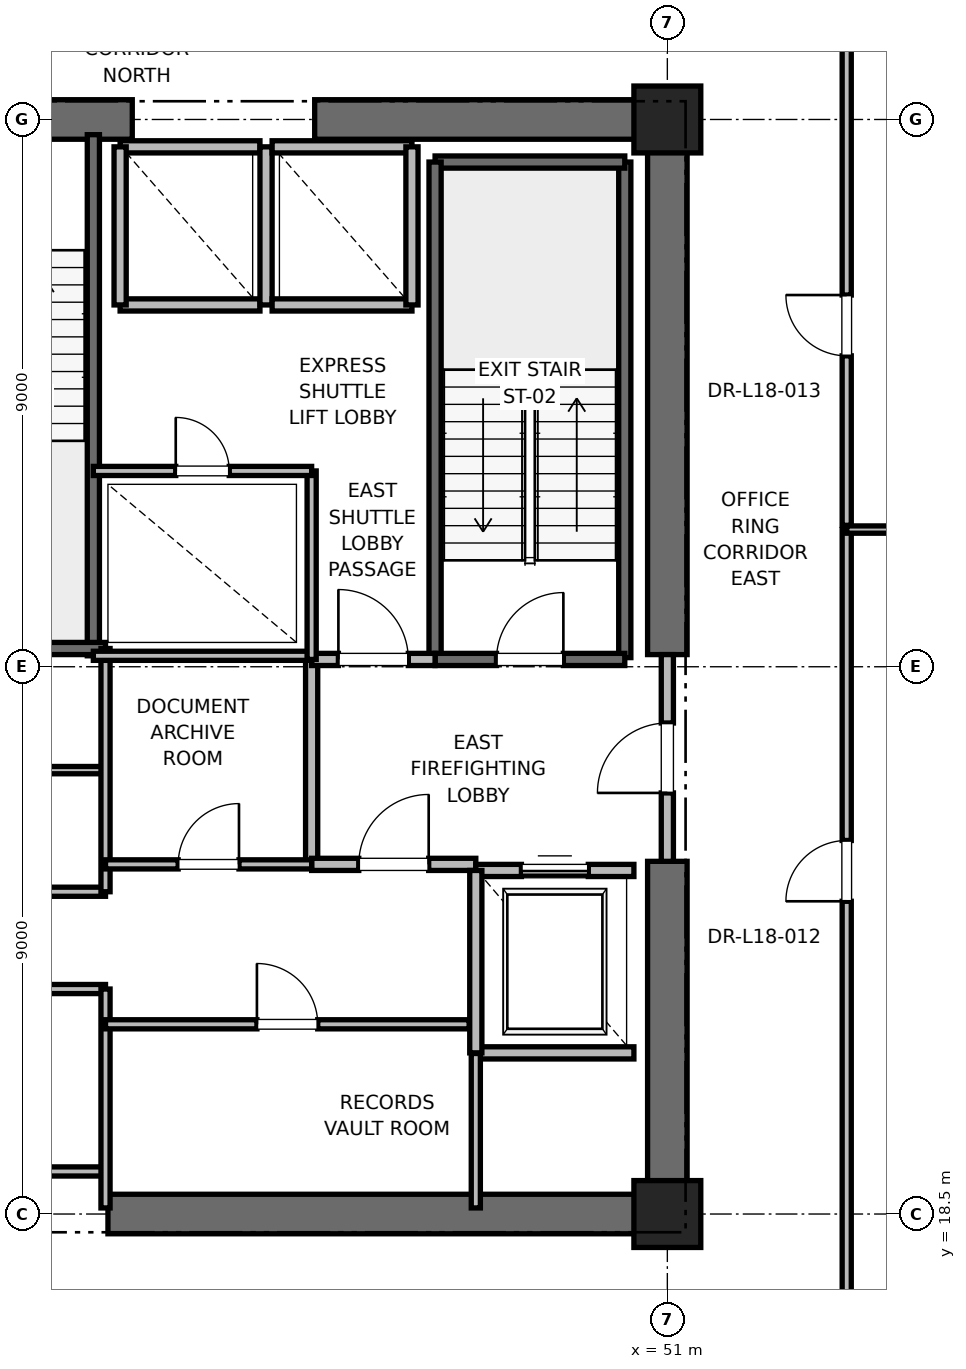
"""IFC4 building model, lengths in metres.
Left out: names, types, materials, properties, quantities, classifications, styles, units other than length and angle.
Written with IfcOpenShell. Run it as: python <this file> out.ifc"""

import sys

from ifc_helpers import new_model, si_unit, direction, frame, frame_2d, origin, origin_2d, place, context, subcontext, project, spatial, rectangle, extrude, element, fill, save


model = new_model("IFC4")
c1 = context("Model", 3, precision=1e-05, world=origin(), true_north=direction((0.0, 1.0)))
c2 = subcontext(c1, "Body", "Model", "MODEL_VIEW")
j1 = project(units=[si_unit("LENGTHUNIT", "METRE"), si_unit("PLANEANGLEUNIT", "RADIAN")], contexts=[c1])
p1 = place(None, origin())
s1 = spatial("IfcSite", under=j1, at=p1, CompositionType="ELEMENT")
p2 = place(p1, origin())
s2 = spatial("IfcBuilding", under=s1, at=p2, CompositionType="ELEMENT")
p3 = place(p2, frame((0.0, 0.0, 79.6)))
s3 = spatial("IfcBuildingStorey", under=s2, at=p3, CompositionType="ELEMENT", Elevation=79.6)
for number, where, z_axis, x_axis in (
    (1, (51.0, 18.5, 0.0), (0.0, 0.0, 1.0), (1.0, 0.0, 0.0)),
    (2, (51.0, 36.5, 0.0), (0.0, 0.0, 1.0), (1.0, 0.0, 0.0)),
):
    element("IfcColumn", number, at=place(p3, frame(where, z_axis=z_axis, x_axis=x_axis)), inside=s3, PredefinedType="PILASTER", context=c2, shape_type="SweptSolid", body=[
        extrude(rectangle(XDim=1.1, YDim=1.1, at=origin_2d()), origin(), (0.0, 0.0, 1.0), 4.0),
    ])
p4 = place(p3, frame((41.8, 18.5, 0.0), z_axis=(0.0, 0.0, 1.0), x_axis=(1.0, 0.0, 0.0)))
e3 = element("IfcWall", 3, at=p4, inside=s3, PredefinedType="SHEAR", context=c2, shape_type="SweptSolid", body=[
    extrude(rectangle(XDim=9.2, YDim=0.65, at=frame_2d((4.6, 0.0))), origin(), (0.0, 0.0, 1.0), 3.76),
])
p5 = place(p3, frame((37.8, 36.5, 0.0), z_axis=(0.0, 0.0, 1.0), x_axis=(1.0, 0.0, 0.0)))
e4 = element("IfcWall", 4, at=p5, inside=s3, PredefinedType="SHEAR", context=c2, shape_type="SweptSolid", body=[
    extrude(rectangle(XDim=4.4, YDim=0.65, at=frame_2d((2.2, 0.0))), origin(), (0.0, 0.0, 1.0), 3.76),
])
p6 = place(p5, frame((1.65, 0.0, 0.0)))
e5 = element("IfcOpeningElement", 5, at=p6, cuts=e4, PredefinedType="OPENING", context=c2, shape_type="SweptSolid", body=[
    extrude(rectangle(XDim=1.1, YDim=2.15, at=frame_2d((0.55, 1.075))), frame((0.0, 0.325, 0.0), z_axis=(0.0, -1.0, 0.0), x_axis=(1.0, 0.0, 0.0)), (0.0, 0.0, 1.0), 0.65),
])
for number, where, z_axis, x_axis in (
    (6, (45.2, 36.5, 0.0), (0.0, 0.0, 1.0), (1.0, 0.0, 0.0)),
    (7, (51.0, 18.5, 0.0), (0.0, 0.0, 1.0), (0.0, 1.0, 0.0)),
):
    element("IfcWall", number, at=place(p3, frame(where, z_axis=z_axis, x_axis=x_axis)), inside=s3, PredefinedType="SHEAR", context=c2, shape_type="SweptSolid", body=[
        extrude(rectangle(XDim=5.8, YDim=0.65, at=frame_2d((2.9, 0.0))), origin(), (0.0, 0.0, 1.0), 3.76),
    ])
p7 = place(p3, frame((51.0, 27.7, 0.0), z_axis=(0.0, 0.0, 1.0), x_axis=(0.0, 1.0, 0.0)))
e8 = element("IfcWall", 8, at=p7, inside=s3, PredefinedType="SHEAR", context=c2, shape_type="SweptSolid", body=[
    extrude(rectangle(XDim=8.8, YDim=0.65, at=frame_2d((4.4, 0.0))), origin(), (0.0, 0.0, 1.0), 3.76),
])
p8 = place(p3, frame((50.3, 27.65, 0.0), z_axis=(0.0, 0.0, 1.0), x_axis=(0.0, 1.0, 0.0)))
e9 = element("IfcWall", 9, at=p8, inside=s3, PredefinedType="SOLIDWALL", context=c2, shape_type="SweptSolid", body=[
    extrude(rectangle(XDim=8.15, YDim=0.2, at=frame_2d((4.075, 0.0))), origin(), (0.0, 0.0, 1.0), 3.76),
])
p9 = place(p3, frame((47.18, 35.8, 0.0), z_axis=(0.0, 0.0, 1.0), x_axis=(1.0, 0.0, 0.0)))
e10 = element("IfcWall", 10, at=p9, inside=s3, PredefinedType="SOLIDWALL", context=c2, shape_type="SweptSolid", body=[
    extrude(rectangle(XDim=3.12, YDim=0.2, at=frame_2d((1.56, 0.0))), origin(), (0.0, 0.0, 1.0), 3.76),
])
p10 = place(p3, frame((47.18, 27.62, 0.0), z_axis=(0.0, 0.0, 1.0), x_axis=(0.0, 1.0, 0.0)))
e11 = element("IfcWall", 11, at=p10, inside=s3, PredefinedType="SOLIDWALL", context=c2, shape_type="SweptSolid", body=[
    extrude(rectangle(XDim=8.18, YDim=0.2, at=frame_2d((4.09, 0.0))), origin(), (0.0, 0.0, 1.0), 3.76),
])
p11 = place(p3, frame((47.18, 27.62, 0.0), z_axis=(0.0, 0.0, 1.0), x_axis=(1.0, 0.0, 0.0)))
e12 = element("IfcWall", 12, at=p11, inside=s3, PredefinedType="SOLIDWALL", context=c2, shape_type="SweptSolid", body=[
    extrude(rectangle(XDim=3.12, YDim=0.2, at=frame_2d((1.56, 0.0))), origin(), (0.0, 0.0, 1.0), 3.76),
])
p12 = place(p11, frame((1.01, 0.0, 0.0)))
e13 = element("IfcOpeningElement", 13, at=p12, cuts=e12, PredefinedType="OPENING", context=c2, shape_type="SweptSolid", body=[
    extrude(rectangle(XDim=1.1, YDim=2.15, at=frame_2d((0.55, 1.075))), frame((0.0, 0.1, 0.0), z_axis=(0.0, -1.0, 0.0), x_axis=(1.0, 0.0, 0.0)), (0.0, 0.0, 1.0), 0.2),
])
p13 = place(p3, frame((41.56, 27.68, 0.0), z_axis=(0.0, 0.0, 1.0), x_axis=(0.0, 1.0, 0.0)))
e14 = element("IfcWall", 14, at=p13, inside=s3, PredefinedType="SOLIDWALL", context=c2, shape_type="SweptSolid", body=[
    extrude(rectangle(XDim=8.57, YDim=0.2, at=frame_2d((4.285, 0.0))), origin(), (0.0, 0.0, 1.0), 3.76),
])
p14 = place(p3, frame((38.44, 27.8, 0.0), z_axis=(0.0, 0.0, 1.0), x_axis=(1.0, 0.0, 0.0)))
e15 = element("IfcWall", 15, at=p14, inside=s3, PredefinedType="SOLIDWALL", context=c2, shape_type="SweptSolid", body=[
    extrude(rectangle(XDim=3.32, YDim=0.2, at=frame_2d((1.66, 0.0))), origin(), (0.0, 0.0, 1.0), 3.76),
])
p15 = place(p3, frame((45.15, 24.25, 0.0), z_axis=(0.0, 0.0, 1.0), x_axis=(0.0, 1.0, 0.0)))
e16 = element("IfcWall", 16, at=p15, inside=s3, PredefinedType="PARTITIONING", context=c2, shape_type="SweptSolid", body=[
    extrude(rectangle(XDim=3.37, YDim=0.2, at=frame_2d((1.685, 0.0))), origin(), (0.0, 0.0, 1.0), 3.76),
])
p16 = place(p3, frame((45.15, 24.25, 0.0), z_axis=(0.0, 0.0, 1.0), x_axis=(1.0, 0.0, 0.0)))
e17 = element("IfcWall", 17, at=p16, inside=s3, PredefinedType="PARTITIONING", context=c2, shape_type="SweptSolid", body=[
    extrude(rectangle(XDim=2.7, YDim=0.2, at=frame_2d((1.35, 0.0))), origin(), (0.0, 0.0, 1.0), 3.76),
])
p17 = place(p16, frame((0.775, 0.0, 0.0)))
e18 = element("IfcOpeningElement", 18, at=p17, cuts=e17, PredefinedType="OPENING", context=c2, shape_type="SweptSolid", body=[
    extrude(rectangle(XDim=1.15, YDim=2.2, at=frame_2d((0.575, 1.1))), frame((0.0, 0.1, 0.0), z_axis=(0.0, -1.0, 0.0), x_axis=(1.0, 0.0, 0.0)), (0.0, 0.0, 1.0), 0.2),
])
p18 = place(p3, frame((45.15, 27.62, 0.0), z_axis=(0.0, 0.0, 1.0), x_axis=(1.0, 0.0, 0.0)))
e19 = element("IfcWall", 19, at=p18, inside=s3, PredefinedType="PARTITIONING", context=c2, shape_type="SweptSolid", body=[
    extrude(rectangle(XDim=2.03, YDim=0.2, at=frame_2d((1.015, 0.0))), origin(), (0.0, 0.0, 1.0), 3.76),
])
p19 = place(p18, frame((0.44, 0.0, 0.0)))
e20 = element("IfcOpeningElement", 20, at=p19, cuts=e19, PredefinedType="OPENING", context=c2, shape_type="SweptSolid", body=[
    extrude(rectangle(XDim=1.15, YDim=2.2, at=frame_2d((0.575, 1.1))), frame((0.0, 0.1, 0.0), z_axis=(0.0, -1.0, 0.0), x_axis=(1.0, 0.0, 0.0)), (0.0, 0.0, 1.0), 0.2),
])
p20 = place(p3, frame((51.0, 24.3, 0.0), z_axis=(0.0, 0.0, 1.0), x_axis=(0.0, 1.0, 0.0)))
e21 = element("IfcWall", 21, at=p20, inside=s3, PredefinedType="PARTITIONING", context=c2, shape_type="SweptSolid", body=[
    extrude(rectangle(XDim=3.4, YDim=0.2, at=frame_2d((1.7, 0.0))), origin(), (0.0, 0.0, 1.0), 2.54),
])
p21 = place(p20, frame((1.125, 0.0, 0.0)))
e22 = element("IfcOpeningElement", 22, at=p21, cuts=e21, PredefinedType="OPENING", context=c2, shape_type="SweptSolid", body=[
    extrude(rectangle(XDim=1.15, YDim=2.2, at=frame_2d((0.575, 1.1))), frame((0.0, 0.1, 0.0), z_axis=(0.0, -1.0, 0.0), x_axis=(1.0, 0.0, 0.0)), (0.0, 0.0, 1.0), 0.2),
])
p22 = place(p3, frame((47.85, 21.15, 0.0), z_axis=(0.0, 0.0, 1.0), x_axis=(1.0, 0.0, 0.0)))
e23 = element("IfcWall", 23, at=p22, inside=s3, PredefinedType="SOLIDWALL", context=c2, shape_type="SweptSolid", body=[
    extrude(rectangle(XDim=2.6, YDim=0.2, at=frame_2d((1.3, 0.0))), origin(), (0.0, 0.0, 1.0), 3.76),
])
p23 = place(p3, frame((50.45, 24.15, 0.0), z_axis=(0.0, 0.0, 1.0), x_axis=(-1.0, 0.0, 0.0)))
e24 = element("IfcWall", 24, at=p23, inside=s3, PredefinedType="SOLIDWALL", context=c2, shape_type="SweptSolid", body=[
    extrude(rectangle(XDim=2.6, YDim=0.2, at=frame_2d((1.3, 0.0))), origin(), (0.0, 0.0, 1.0), 2.54),
])
p24 = place(p23, frame((0.75, 0.0, 0.0)))
e25 = element("IfcOpeningElement", 25, at=p24, cuts=e24, PredefinedType="OPENING", context=c2, shape_type="SweptSolid", body=[
    extrude(rectangle(XDim=1.1, YDim=2.2, at=frame_2d((0.55, 1.1))), frame((0.0, 0.1, 0.0), z_axis=(0.0, -1.0, 0.0), x_axis=(1.0, 0.0, 0.0)), (0.0, 0.0, 1.0), 0.2),
])
p25 = place(p3, frame((47.85, 24.15, 0.0), z_axis=(0.0, 0.0, 1.0), x_axis=(0.0, -1.0, 0.0)))
e26 = element("IfcWall", 26, at=p25, inside=s3, PredefinedType="SOLIDWALL", context=c2, shape_type="SweptSolid", body=[
    extrude(rectangle(XDim=3.0, YDim=0.2, at=frame_2d((1.5, 0.0))), origin(), (0.0, 0.0, 1.0), 3.76),
])
p26 = place(p3, frame((42.0, 33.45, 0.0), z_axis=(0.0, 0.0, 1.0), x_axis=(1.0, 0.0, 0.0)))
e27 = element("IfcWall", 27, at=p26, inside=s3, PredefinedType="SOLIDWALL", context=c2, shape_type="SweptSolid", body=[
    extrude(rectangle(XDim=2.3, YDim=0.2, at=frame_2d((1.15, 0.0))), origin(), (0.0, 0.0, 1.0), 3.76),
])
p27 = place(p3, frame((44.3, 36.05, 0.0), z_axis=(0.0, 0.0, 1.0), x_axis=(-1.0, 0.0, 0.0)))
e28 = element("IfcWall", 28, at=p27, inside=s3, PredefinedType="SOLIDWALL", context=c2, shape_type="SweptSolid", body=[
    extrude(rectangle(XDim=2.3, YDim=0.2, at=frame_2d((1.15, 0.0))), origin(), (0.0, 0.0, 1.0), 2.54),
])
for number, where, z_axis, x_axis in (
    (29, (42.0, 36.05, 0.0), (0.0, 0.0, 1.0), (0.0, -1.0, 0.0)),
    (30, (44.4, 33.45, 0.0), (0.0, 0.0, 1.0), (0.0, 1.0, 0.0)),
):
    element("IfcWall", number, at=place(p3, frame(where, z_axis=z_axis, x_axis=x_axis)), inside=s3, PredefinedType="SOLIDWALL", context=c2, shape_type="SweptSolid", body=[
        extrude(rectangle(XDim=2.6, YDim=0.2, at=frame_2d((1.3, 0.0))), origin(), (0.0, 0.0, 1.0), 2.54),
    ])
p28 = place(p3, frame((44.5, 33.45, 0.0), z_axis=(0.0, 0.0, 1.0), x_axis=(1.0, 0.0, 0.0)))
e31 = element("IfcWall", 31, at=p28, inside=s3, PredefinedType="SOLIDWALL", context=c2, shape_type="SweptSolid", body=[
    extrude(rectangle(XDim=2.3, YDim=0.2, at=frame_2d((1.15, 0.0))), origin(), (0.0, 0.0, 1.0), 3.76),
])
p29 = place(p3, frame((46.8, 36.05, 0.0), z_axis=(0.0, 0.0, 1.0), x_axis=(-1.0, 0.0, 0.0)))
e32 = element("IfcWall", 32, at=p29, inside=s3, PredefinedType="SOLIDWALL", context=c2, shape_type="SweptSolid", body=[
    extrude(rectangle(XDim=2.3, YDim=0.2, at=frame_2d((1.15, 0.0))), origin(), (0.0, 0.0, 1.0), 2.54),
])
p30 = place(p3, frame((46.8, 33.45, 0.0), z_axis=(0.0, 0.0, 1.0), x_axis=(0.0, 1.0, 0.0)))
e33 = element("IfcWall", 33, at=p30, inside=s3, PredefinedType="SOLIDWALL", context=c2, shape_type="SweptSolid", body=[
    extrude(rectangle(XDim=2.6, YDim=0.2, at=frame_2d((1.3, 0.0))), origin(), (0.0, 0.0, 1.0), 3.76),
])
for number, where, z_axis, x_axis in (
    (34, (39.95, 19.2, 0.0), (0.0, 0.0, 1.0), (1.0, 0.0, 0.0)),
    (35, (39.95, 22.2, 0.0), (0.0, 0.0, 1.0), (1.0, 0.0, 0.0)),
    (36, (39.95, 23.8, 0.0), (0.0, 0.0, 1.0), (1.0, 0.0, 0.0)),
):
    element("IfcWall", number, at=place(p3, frame(where, z_axis=z_axis, x_axis=x_axis)), inside=s3, PredefinedType="PARTITIONING", context=c2, shape_type="SweptSolid", body=[
        extrude(rectangle(XDim=1.81, YDim=0.15, at=frame_2d((0.905, 0.0))), origin(), (0.0, 0.0, 1.0), 2.85),
    ])
p31 = place(p3, frame((39.95, 25.8, 0.0), z_axis=(0.0, 0.0, 1.0), x_axis=(1.0, 0.0, 0.0)))
e37 = element("IfcWall", 37, at=p31, inside=s3, PredefinedType="PARTITIONING", context=c2, shape_type="SweptSolid", body=[
    extrude(rectangle(XDim=1.81, YDim=0.12, at=frame_2d((0.905, 0.0))), origin(), (0.0, 0.0, 1.0), 2.85),
])
p32 = place(p3, frame((41.76, 18.6, 0.0), z_axis=(0.0, 0.0, 1.0), x_axis=(0.0, 1.0, 0.0)))
e38 = element("IfcWall", 38, at=p32, inside=s3, PredefinedType="PARTITIONING", context=c2, shape_type="SweptSolid", body=[
    extrude(rectangle(XDim=3.6, YDim=0.15, at=frame_2d((1.8, 0.0))), origin(), (0.0, 0.0, 1.0), 2.54),
])
p33 = place(p3, frame((41.76, 23.8, 0.0), z_axis=(0.0, 0.0, 1.0), x_axis=(0.0, 1.0, 0.0)))
e39 = element("IfcWall", 39, at=p33, inside=s3, PredefinedType="PARTITIONING", context=c2, shape_type="SweptSolid", body=[
    extrude(rectangle(XDim=4.0, YDim=0.15, at=frame_2d((2.0, 0.0))), origin(), (0.0, 0.0, 1.0), 2.85),
])
p34 = place(p3, frame((41.56, 27.68, 0.0), z_axis=(0.0, 0.0, 1.0), x_axis=(1.0, 0.0, 0.0)))
e40 = element("IfcWall", 40, at=p34, inside=s3, PredefinedType="PARTITIONING", context=c2, shape_type="SweptSolid", body=[
    extrude(rectangle(XDim=3.59, YDim=0.15, at=frame_2d((1.795, 0.0))), origin(), (0.0, 0.0, 1.0), 2.85),
])
p35 = place(p3, frame((47.85, 18.6, 0.0), z_axis=(0.0, 0.0, 1.0), x_axis=(0.0, 1.0, 0.0)))
e41 = element("IfcWall", 41, at=p35, inside=s3, PredefinedType="PARTITIONING", context=c2, shape_type="SweptSolid", body=[
    extrude(rectangle(XDim=2.54, YDim=0.15, at=frame_2d((1.27, 0.0))), origin(), (0.0, 0.0, 1.0), 2.85),
])
p36 = place(p3, frame((41.76, 21.62, 0.0), z_axis=(0.0, 0.0, 1.0), x_axis=(1.0, 0.0, 0.0)))
e42 = element("IfcWall", 42, at=p36, inside=s3, PredefinedType="PARTITIONING", context=c2, shape_type="SweptSolid", body=[
    extrude(rectangle(XDim=5.98, YDim=0.15, at=frame_2d((2.99, 0.0))), origin(), (0.0, 0.0, 1.0), 2.85),
])
p37 = place(p36, frame((2.49, 0.0, 0.0)))
e43 = element("IfcOpeningElement", 43, at=p37, cuts=e42, PredefinedType="OPENING", context=c2, shape_type="SweptSolid", body=[
    extrude(rectangle(XDim=1.0, YDim=2.15, at=frame_2d((0.5, 1.075))), frame((0.0, 0.075, 0.0), z_axis=(0.0, -1.0, 0.0), x_axis=(1.0, 0.0, 0.0)), (0.0, 0.0, 1.0), 0.15),
])
p38 = place(p3, frame((41.76, 24.25, 0.0), z_axis=(0.0, 0.0, 1.0), x_axis=(1.0, 0.0, 0.0)))
e44 = element("IfcWall", 44, at=p38, inside=s3, PredefinedType="PARTITIONING", context=c2, shape_type="SweptSolid", body=[
    extrude(rectangle(XDim=3.39, YDim=0.15, at=frame_2d((1.695, 0.0))), origin(), (0.0, 0.0, 1.0), 2.85),
])
p39 = place(p38, frame((1.195, 0.0, 0.0)))
e45 = element("IfcOpeningElement", 45, at=p39, cuts=e44, PredefinedType="OPENING", context=c2, shape_type="SweptSolid", body=[
    extrude(rectangle(XDim=1.0, YDim=2.15, at=frame_2d((0.5, 1.075))), frame((0.0, 0.075, 0.0), z_axis=(0.0, -1.0, 0.0), x_axis=(1.0, 0.0, 0.0)), (0.0, 0.0, 1.0), 0.15),
])
p40 = place(p3, frame((45.15, 27.62, 0.0), z_axis=(0.0, 0.0, 1.0), x_axis=(0.0, 1.0, 0.0)))
e46 = element("IfcWall", 46, at=p40, inside=s3, PredefinedType="PARTITIONING", context=c2, shape_type="SweptSolid", body=[
    extrude(rectangle(XDim=3.1, YDim=0.15, at=frame_2d((1.55, 0.0))), origin(), (0.0, 0.0, 1.0), 2.85),
])
p41 = place(p3, frame((41.56, 30.72, 0.0), z_axis=(0.0, 0.0, 1.0), x_axis=(1.0, 0.0, 0.0)))
e47 = element("IfcWall", 47, at=p41, inside=s3, PredefinedType="PARTITIONING", context=c2, shape_type="SweptSolid", body=[
    extrude(rectangle(XDim=3.59, YDim=0.15, at=frame_2d((1.795, 0.0))), origin(), (0.0, 0.0, 1.0), 2.85),
])
p42 = place(p41, frame((1.355, 0.0, 0.0)))
e48 = element("IfcOpeningElement", 48, at=p42, cuts=e47, PredefinedType="OPENING", context=c2, shape_type="SweptSolid", body=[
    extrude(rectangle(XDim=0.88, YDim=2.1, at=frame_2d((0.44, 1.05))), frame((0.0, 0.075, 0.0), z_axis=(0.0, -1.0, 0.0), x_axis=(1.0, 0.0, 0.0)), (0.0, 0.0, 1.0), 0.15),
])
p43 = place(p3, frame((53.95, 8.7, 0.0), z_axis=(0.0, 0.0, 1.0), x_axis=(0.0, 1.0, 0.0)))
e49 = element("IfcWall", 49, at=p43, inside=s3, PredefinedType="PARTITIONING", context=c2, shape_type="SweptSolid", body=[
    extrude(rectangle(XDim=21.056, YDim=0.15, at=frame_2d((10.528, 0.0))), origin(), (0.0, 0.0, 1.0), 2.85),
])
p44 = place(p43, frame((14.943, 0.0, 0.0)))
e50 = element("IfcOpeningElement", 50, at=p44, cuts=e49, PredefinedType="OPENING", context=c2, shape_type="SweptSolid", body=[
    extrude(rectangle(XDim=1.0, YDim=2.15, at=frame_2d((0.5, 1.075))), frame((0.0, 0.075, 0.0), z_axis=(0.0, -1.0, 0.0), x_axis=(1.0, 0.0, 0.0)), (0.0, 0.0, 1.0), 0.15),
])
p45 = place(p3, frame((53.95, 29.756, 0.0), z_axis=(0.0, 0.0, 1.0), x_axis=(1.0, 0.0, 0.0)))
e51 = element("IfcWall", 51, at=p45, inside=s3, PredefinedType="PARTITIONING", context=c2, shape_type="SweptSolid", body=[
    extrude(rectangle(XDim=12.179, YDim=0.12, at=frame_2d((6.089, 0.0))), origin(), (0.0, 0.0, 1.0), 2.85),
])
p46 = place(p3, frame((53.95, 29.826, 0.0), z_axis=(0.0, 0.0, 1.0), x_axis=(0.0, 1.0, 0.0)))
e52 = element("IfcWall", 52, at=p46, inside=s3, PredefinedType="PARTITIONING", context=c2, shape_type="SweptSolid", body=[
    extrude(rectangle(XDim=16.474, YDim=0.15, at=frame_2d((8.237, 0.0))), origin(), (0.0, 0.0, 1.0), 2.85),
])
p47 = place(p46, frame((2.787, 0.0, 0.0)))
e53 = element("IfcOpeningElement", 53, at=p47, cuts=e52, PredefinedType="OPENING", context=c2, shape_type="SweptSolid", body=[
    extrude(rectangle(XDim=1.0, YDim=2.15, at=frame_2d((0.5, 1.075))), frame((0.0, 0.075, 0.0), z_axis=(0.0, -1.0, 0.0), x_axis=(1.0, 0.0, 0.0)), (0.0, 0.0, 1.0), 0.15),
])
p48 = place(p12, origin())
e54 = element("IfcDoor", 54, at=p48, inside=s3, OperationType="SINGLE_SWING_RIGHT", PredefinedType="DOOR", context=c2, shape_type="SweptSolid", body=[
    extrude(rectangle(XDim=1.1, YDim=2.15, at=frame_2d((0.55, 1.075))), frame((0.0, 0.025, 0.0), z_axis=(0.0, -1.0, 0.0), x_axis=(1.0, 0.0, 0.0)), (0.0, 0.0, 1.0), 0.05),
])
fill(e13, e54)
p49 = place(p17, origin())
e55 = element("IfcDoor", 55, at=p49, inside=s3, OperationType="SINGLE_SWING_RIGHT", PredefinedType="DOOR", context=c2, shape_type="SweptSolid", body=[
    extrude(rectangle(XDim=1.15, YDim=2.2, at=frame_2d((0.575, 1.1))), frame((0.0, 0.025, 0.0), z_axis=(0.0, -1.0, 0.0), x_axis=(1.0, 0.0, 0.0)), (0.0, 0.0, 1.0), 0.05),
])
fill(e18, e55)
p50 = place(p19, origin())
e56 = element("IfcDoor", 56, at=p50, inside=s3, OperationType="SINGLE_SWING_LEFT", PredefinedType="DOOR", context=c2, shape_type="SweptSolid", body=[
    extrude(rectangle(XDim=1.15, YDim=2.2, at=frame_2d((0.575, 1.1))), frame((0.0, 0.025, 0.0), z_axis=(0.0, -1.0, 0.0), x_axis=(1.0, 0.0, 0.0)), (0.0, 0.0, 1.0), 0.05),
])
fill(e20, e56)
p51 = place(p21, origin())
e57 = element("IfcDoor", 57, at=p51, inside=s3, OperationType="SINGLE_SWING_LEFT", PredefinedType="DOOR", context=c2, shape_type="SweptSolid", body=[
    extrude(rectangle(XDim=1.15, YDim=2.2, at=frame_2d((0.575, 1.1))), frame((0.0, 0.025, 0.0), z_axis=(0.0, -1.0, 0.0), x_axis=(1.0, 0.0, 0.0)), (0.0, 0.0, 1.0), 0.05),
])
fill(e22, e57)
p52 = place(p24, origin())
e58 = element("IfcDoor", 58, at=p52, inside=s3, OperationType="SLIDING_TO_RIGHT", PredefinedType="DOOR", context=c2, shape_type="SweptSolid", body=[
    extrude(rectangle(XDim=1.1, YDim=2.2, at=frame_2d((0.55, 1.1))), frame((0.0, 0.025, 0.0), z_axis=(0.0, -1.0, 0.0), x_axis=(1.0, 0.0, 0.0)), (0.0, 0.0, 1.0), 0.05),
])
fill(e25, e58)
p53 = place(p37, origin())
e59 = element("IfcDoor", 59, at=p53, inside=s3, OperationType="SINGLE_SWING_LEFT", PredefinedType="DOOR", context=c2, shape_type="SweptSolid", body=[
    extrude(rectangle(XDim=1.0, YDim=2.15, at=frame_2d((0.5, 1.075))), frame((0.0, 0.025, 0.0), z_axis=(0.0, -1.0, 0.0), x_axis=(1.0, 0.0, 0.0)), (0.0, 0.0, 1.0), 0.05),
])
fill(e43, e59)
p54 = place(p39, origin())
e60 = element("IfcDoor", 60, at=p54, inside=s3, OperationType="SINGLE_SWING_RIGHT", PredefinedType="DOOR", context=c2, shape_type="SweptSolid", body=[
    extrude(rectangle(XDim=1.0, YDim=2.15, at=frame_2d((0.5, 1.075))), frame((0.0, 0.025, 0.0), z_axis=(0.0, -1.0, 0.0), x_axis=(1.0, 0.0, 0.0)), (0.0, 0.0, 1.0), 0.05),
])
fill(e45, e60)
p55 = place(p42, origin())
e61 = element("IfcDoor", 61, at=p55, inside=s3, OperationType="SINGLE_SWING_LEFT", PredefinedType="DOOR", context=c2, shape_type="SweptSolid", body=[
    extrude(rectangle(XDim=0.88, YDim=2.1, at=frame_2d((0.44, 1.05))), frame((0.0, 0.025, 0.0), z_axis=(0.0, -1.0, 0.0), x_axis=(1.0, 0.0, 0.0)), (0.0, 0.0, 1.0), 0.05),
])
fill(e48, e61)
p56 = place(p44, origin())
e62 = element("IfcDoor", 62, at=p56, inside=s3, OperationType="SINGLE_SWING_LEFT", PredefinedType="DOOR", context=c2, shape_type="SweptSolid", body=[
    extrude(rectangle(XDim=1.0, YDim=2.15, at=frame_2d((0.5, 1.075))), frame((0.0, 0.025, 0.0), z_axis=(0.0, -1.0, 0.0), x_axis=(1.0, 0.0, 0.0)), (0.0, 0.0, 1.0), 0.05),
])
fill(e50, e62)
p57 = place(p47, origin())
e63 = element("IfcDoor", 63, at=p57, inside=s3, OperationType="SINGLE_SWING_RIGHT", PredefinedType="DOOR", context=c2, shape_type="SweptSolid", body=[
    extrude(rectangle(XDim=1.0, YDim=2.15, at=frame_2d((0.5, 1.075))), frame((0.0, 0.025, 0.0), z_axis=(0.0, -1.0, 0.0), x_axis=(1.0, 0.0, 0.0)), (0.0, 0.0, 1.0), 0.05),
])
fill(e53, e63)
save(model, sys.argv[1])
